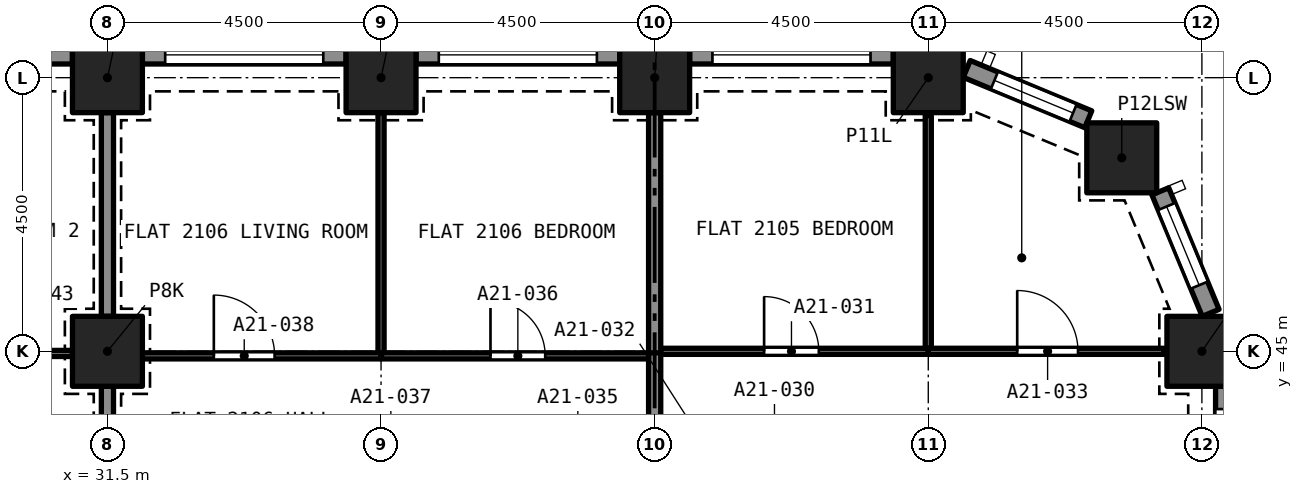
"""IFC4 building model, lengths in metres.
Left out: names, types, materials, properties, quantities, classifications, styles, units other than length and angle.
Written with IfcOpenShell. Run it as: python <this file> out.ifc"""

import sys

from ifc_helpers import new_model, si_unit, direction, frame, frame_2d, origin, origin_2d, place, context, subcontext, project, spatial, rectangle, extrude, element, fill, save


model = new_model("IFC4")
c1 = context("Model", 3, precision=1e-05, world=origin(), true_north=direction((0.0, 1.0)))
c2 = subcontext(c1, "Body", "Model", "MODEL_VIEW")
j1 = project(units=[si_unit("LENGTHUNIT", "METRE"), si_unit("PLANEANGLEUNIT", "RADIAN")], contexts=[c1])
p1 = place(None, origin())
s1 = spatial("IfcSite", under=j1, at=p1, CompositionType="ELEMENT")
p2 = place(p1, origin())
s2 = spatial("IfcBuilding", under=s1, at=p2, CompositionType="ELEMENT")
p3 = place(p2, frame((0.0, 0.0, 80.0)))
s3 = spatial("IfcBuildingStorey", under=s2, at=p3, CompositionType="ELEMENT", Elevation=80.0)
for number, where, z_axis, x_axis in (
    (1, (31.5, 45.0, 0.0), (0.0, 0.0, 1.0), (1.0, 0.0, 0.0)),
    (2, (49.5, 45.0, 0.0), (0.0, 0.0, 1.0), (1.0, 0.0, 0.0)),
    (3, (48.182, 48.182, 0.0), (0.0, 0.0, 1.0), (1.0, 0.0, 0.0)),
    (4, (31.5, 49.5, 0.0), (0.0, 0.0, 1.0), (1.0, 0.0, 0.0)),
    (5, (36.0, 49.5, 0.0), (0.0, 0.0, 1.0), (1.0, 0.0, 0.0)),
    (6, (40.5, 49.5, 0.0), (0.0, 0.0, 1.0), (1.0, 0.0, 0.0)),
    (7, (45.0, 49.5, 0.0), (0.0, 0.0, 1.0), (1.0, 0.0, 0.0)),
):
    element("IfcColumn", number, at=place(p3, frame(where, z_axis=z_axis, x_axis=x_axis)), inside=s3, PredefinedType="COLUMN", context=c2, shape_type="SweptSolid", body=[
        extrude(rectangle(XDim=1.15, YDim=1.15, at=origin_2d()), origin(), (0.0, 0.0, 1.0), 3.2),
    ])
p4 = place(p3, frame((49.875, 44.425, 0.0), z_axis=(0.0, 0.0, 1.0), x_axis=(0.0, -1.0, 0.0)))
e8 = element("IfcWall", 8, at=p4, inside=s3, PredefinedType="SOLIDWALL", context=c2, shape_type="SweptSolid", body=[
    extrude(rectangle(XDim=3.35, YDim=0.3, at=frame_2d((1.675, 0.0))), origin(), (0.0, 0.0, 1.0), 3.2),
])
p5 = place(p4, frame((0.375, 0.0, 0.45)))
e9 = element("IfcOpeningElement", 9, at=p5, cuts=e8, PredefinedType="OPENING", context=c2, shape_type="SweptSolid", body=[
    extrude(rectangle(XDim=2.6, YDim=1.95, at=frame_2d((1.3, 0.975))), frame((0.0, 0.16, 0.0), z_axis=(0.0, -1.0, 0.0), x_axis=(1.0, 0.0, 0.0)), (0.0, 0.0, 1.0), 0.32),
])
p6 = place(p3, frame((48.816, 47.631, 0.0), z_axis=(0.0, 0.0, 1.0), x_axis=(0.382723818695, -0.923862802911, 0.0)))
e10 = element("IfcWall", 10, at=p6, inside=s3, PredefinedType="SOLIDWALL", context=c2, shape_type="SweptSolid", body=[
    extrude(rectangle(XDim=2.164, YDim=0.3, at=frame_2d((1.082, 0.0))), origin(), (0.0, 0.0, 1.0), 3.2),
])
p7 = place(p6, frame((0.271, 0.0, 0.45)))
e11 = element("IfcOpeningElement", 11, at=p7, cuts=e10, PredefinedType="OPENING", context=c2, shape_type="SweptSolid", body=[
    extrude(rectangle(XDim=1.4, YDim=1.95, at=frame_2d((0.7, 0.975))), frame((0.0, 0.16, 0.0), z_axis=(0.0, -1.0, 0.0), x_axis=(1.0, 0.0, 0.0)), (0.0, 0.0, 1.0), 0.32),
])
p8 = place(p3, frame((45.632, 49.644, 0.0), z_axis=(0.0, 0.0, 1.0), x_axis=(0.923862802911, -0.382723818695, 0.0)))
e12 = element("IfcWall", 12, at=p8, inside=s3, PredefinedType="SOLIDWALL", context=c2, shape_type="SweptSolid", body=[
    extrude(rectangle(XDim=2.164, YDim=0.3, at=frame_2d((1.082, 0.0))), origin(), (0.0, 0.0, 1.0), 3.2),
])
p9 = place(p8, frame((0.493, 0.0, 0.45)))
e13 = element("IfcOpeningElement", 13, at=p9, cuts=e12, PredefinedType="OPENING", context=c2, shape_type="SweptSolid", body=[
    extrude(rectangle(XDim=1.4, YDim=1.95, at=frame_2d((0.7, 0.975))), frame((0.0, 0.16, 0.0), z_axis=(0.0, -1.0, 0.0), x_axis=(1.0, 0.0, 0.0)), (0.0, 0.0, 1.0), 0.32),
])
p10 = place(p3, frame((41.075, 49.875, 0.0), z_axis=(0.0, 0.0, 1.0), x_axis=(1.0, 0.0, 0.0)))
e14 = element("IfcWall", 14, at=p10, inside=s3, PredefinedType="SOLIDWALL", context=c2, shape_type="SweptSolid", body=[
    extrude(rectangle(XDim=3.35, YDim=0.3, at=frame_2d((1.675, 0.0))), origin(), (0.0, 0.0, 1.0), 3.2),
])
p11 = place(p10, frame((0.375, 0.0, 0.45)))
e15 = element("IfcOpeningElement", 15, at=p11, cuts=e14, PredefinedType="OPENING", context=c2, shape_type="SweptSolid", body=[
    extrude(rectangle(XDim=2.6, YDim=1.95, at=frame_2d((1.3, 0.975))), frame((0.0, 0.16, 0.0), z_axis=(0.0, -1.0, 0.0), x_axis=(1.0, 0.0, 0.0)), (0.0, 0.0, 1.0), 0.32),
])
p12 = place(p3, frame((36.575, 49.875, 0.0), z_axis=(0.0, 0.0, 1.0), x_axis=(1.0, 0.0, 0.0)))
e16 = element("IfcWall", 16, at=p12, inside=s3, PredefinedType="SOLIDWALL", context=c2, shape_type="SweptSolid", body=[
    extrude(rectangle(XDim=3.35, YDim=0.3, at=frame_2d((1.675, 0.0))), origin(), (0.0, 0.0, 1.0), 3.2),
])
p13 = place(p12, frame((0.375, 0.0, 0.45)))
e17 = element("IfcOpeningElement", 17, at=p13, cuts=e16, PredefinedType="OPENING", context=c2, shape_type="SweptSolid", body=[
    extrude(rectangle(XDim=2.6, YDim=1.95, at=frame_2d((1.3, 0.975))), frame((0.0, 0.16, 0.0), z_axis=(0.0, -1.0, 0.0), x_axis=(1.0, 0.0, 0.0)), (0.0, 0.0, 1.0), 0.32),
])
p14 = place(p3, frame((32.075, 49.875, 0.0), z_axis=(0.0, 0.0, 1.0), x_axis=(1.0, 0.0, 0.0)))
e18 = element("IfcWall", 18, at=p14, inside=s3, PredefinedType="SOLIDWALL", context=c2, shape_type="SweptSolid", body=[
    extrude(rectangle(XDim=3.35, YDim=0.3, at=frame_2d((1.675, 0.0))), origin(), (0.0, 0.0, 1.0), 3.2),
])
p15 = place(p14, frame((0.375, 0.0, 0.45)))
e19 = element("IfcOpeningElement", 19, at=p15, cuts=e18, PredefinedType="OPENING", context=c2, shape_type="SweptSolid", body=[
    extrude(rectangle(XDim=2.6, YDim=1.95, at=frame_2d((1.3, 0.975))), frame((0.0, 0.16, 0.0), z_axis=(0.0, -1.0, 0.0), x_axis=(1.0, 0.0, 0.0)), (0.0, 0.0, 1.0), 0.32),
])
p16 = place(p3, frame((27.575, 49.875, 0.0), z_axis=(0.0, 0.0, 1.0), x_axis=(1.0, 0.0, 0.0)))
e20 = element("IfcWall", 20, at=p16, inside=s3, PredefinedType="SOLIDWALL", context=c2, shape_type="SweptSolid", body=[
    extrude(rectangle(XDim=3.35, YDim=0.3, at=frame_2d((1.675, 0.0))), origin(), (0.0, 0.0, 1.0), 3.2),
])
p17 = place(p16, frame((0.375, 0.0, 0.45)))
e21 = element("IfcOpeningElement", 21, at=p17, cuts=e20, PredefinedType="OPENING", context=c2, shape_type="SweptSolid", body=[
    extrude(rectangle(XDim=2.6, YDim=1.95, at=frame_2d((1.3, 0.975))), frame((0.0, 0.16, 0.0), z_axis=(0.0, -1.0, 0.0), x_axis=(1.0, 0.0, 0.0)), (0.0, 0.0, 1.0), 0.32),
])
p18 = place(p3, frame((40.6, 45.0, 0.0), z_axis=(0.0, 0.0, 1.0), x_axis=(1.0, 0.0, 0.0)))
e22 = element("IfcWall", 22, at=p18, inside=s3, PredefinedType="PARTITIONING", context=c2, shape_type="SweptSolid", body=[
    extrude(rectangle(XDim=4.4, YDim=0.1, at=frame_2d((2.2, 0.0))), origin(), (0.0, 0.0, 1.0), 2.9),
])
p19 = place(p18, frame((1.7, 0.0, 0.0)))
e23 = element("IfcOpeningElement", 23, at=p19, cuts=e22, PredefinedType="OPENING", context=c2, shape_type="SweptSolid", body=[
    extrude(rectangle(XDim=0.9, YDim=2.1, at=frame_2d((0.45, 1.05))), frame((0.0, 0.06, 0.0), z_axis=(0.0, -1.0, 0.0), x_axis=(1.0, 0.0, 0.0)), (0.0, 0.0, 1.0), 0.12),
])
p20 = place(p3, frame((45.0, 45.05, 0.0), z_axis=(0.0, 0.0, 1.0), x_axis=(0.0, 1.0, 0.0)))
e24 = element("IfcWall", 24, at=p20, inside=s3, PredefinedType="PARTITIONING", context=c2, shape_type="SweptSolid", body=[
    extrude(rectangle(XDim=3.828, YDim=0.1, at=frame_2d((1.914, 0.0))), origin(), (0.0, 0.0, 1.0), 2.9),
])
p21 = place(p3, frame((40.5, 44.95, 0.0), z_axis=(0.0, 0.0, 1.0), x_axis=(0.0, 1.0, 0.0)))
e25 = element("IfcWall", 25, at=p21, inside=s3, PredefinedType="PARTITIONING", context=c2, shape_type="SweptSolid", body=[
    extrude(rectangle(XDim=3.975, YDim=0.2, at=frame_2d((1.988, 0.0))), origin(), (0.0, 0.0, 1.0), 2.9),
])
p22 = place(p3, frame((45.0, 45.0, 0.0), z_axis=(0.0, 0.0, 1.0), x_axis=(1.0, 0.0, 0.0)))
e26 = element("IfcWall", 26, at=p22, inside=s3, PredefinedType="PARTITIONING", context=c2, shape_type="SweptSolid", body=[
    extrude(rectangle(XDim=3.878, YDim=0.1, at=frame_2d((1.939, 0.0))), origin(), (0.0, 0.0, 1.0), 2.9),
])
p23 = place(p22, frame((1.462, 0.0, 0.0)))
e27 = element("IfcOpeningElement", 27, at=p23, cuts=e26, PredefinedType="OPENING", context=c2, shape_type="SweptSolid", body=[
    extrude(rectangle(XDim=1.0, YDim=2.1, at=frame_2d((0.5, 1.05))), frame((0.0, 0.06, 0.0), z_axis=(0.0, -1.0, 0.0), x_axis=(1.0, 0.0, 0.0)), (0.0, 0.0, 1.0), 0.12),
])
p24 = place(p3, frame((40.5, 43.61, 0.0), z_axis=(0.0, 0.0, 1.0), x_axis=(0.0, 1.0, 0.0)))
e28 = element("IfcWall", 28, at=p24, inside=s3, PredefinedType="PARTITIONING", context=c2, shape_type="SweptSolid", body=[
    extrude(rectangle(XDim=1.365, YDim=0.2, at=frame_2d((0.683, 0.0))), origin(), (0.0, 0.0, 1.0), 2.9),
])
p25 = place(p3, frame((36.0, 44.925, 0.0), z_axis=(0.0, 0.0, 1.0), x_axis=(1.0, 0.0, 0.0)))
e29 = element("IfcWall", 29, at=p25, inside=s3, PredefinedType="PARTITIONING", context=c2, shape_type="SweptSolid", body=[
    extrude(rectangle(XDim=4.4, YDim=0.1, at=frame_2d((2.2, 0.0))), origin(), (0.0, 0.0, 1.0), 2.9),
])
p26 = place(p25, frame((1.8, 0.0, 0.0)))
e30 = element("IfcOpeningElement", 30, at=p26, cuts=e29, PredefinedType="OPENING", context=c2, shape_type="SweptSolid", body=[
    extrude(rectangle(XDim=0.9, YDim=2.1, at=frame_2d((0.45, 1.05))), frame((0.0, 0.06, 0.0), z_axis=(0.0, -1.0, 0.0), x_axis=(1.0, 0.0, 0.0)), (0.0, 0.0, 1.0), 0.12),
])
p27 = place(p3, frame((36.0, 44.975, 0.0), z_axis=(0.0, 0.0, 1.0), x_axis=(0.0, 1.0, 0.0)))
e31 = element("IfcWall", 31, at=p27, inside=s3, PredefinedType="PARTITIONING", context=c2, shape_type="SweptSolid", body=[
    extrude(rectangle(XDim=3.95, YDim=0.1, at=frame_2d((1.975, 0.0))), origin(), (0.0, 0.0, 1.0), 2.9),
])
p28 = place(p3, frame((32.075, 44.925, 0.0), z_axis=(0.0, 0.0, 1.0), x_axis=(1.0, 0.0, 0.0)))
e32 = element("IfcWall", 32, at=p28, inside=s3, PredefinedType="PARTITIONING", context=c2, shape_type="SweptSolid", body=[
    extrude(rectangle(XDim=3.925, YDim=0.1, at=frame_2d((1.962, 0.0))), origin(), (0.0, 0.0, 1.0), 2.9),
])
p29 = place(p28, frame((1.175, 0.0, 0.0)))
e33 = element("IfcOpeningElement", 33, at=p29, cuts=e32, PredefinedType="OPENING", context=c2, shape_type="SweptSolid", body=[
    extrude(rectangle(XDim=1.0, YDim=2.1, at=frame_2d((0.5, 1.05))), frame((0.0, 0.06, 0.0), z_axis=(0.0, -1.0, 0.0), x_axis=(1.0, 0.0, 0.0)), (0.0, 0.0, 1.0), 0.12),
])
for number, where, z_axis, x_axis in (
    (34, (31.5, 41.075, 0.0), (0.0, 0.0, 1.0), (0.0, 1.0, 0.0)),
    (35, (31.5, 45.575, 0.0), (0.0, 0.0, 1.0), (0.0, 1.0, 0.0)),
):
    element("IfcWall", number, at=place(p3, frame(where, z_axis=z_axis, x_axis=x_axis)), inside=s3, PredefinedType="PARTITIONING", context=c2, shape_type="SweptSolid", body=[
        extrude(rectangle(XDim=3.35, YDim=0.2, at=frame_2d((1.675, 0.0))), origin(), (0.0, 0.0, 1.0), 2.38),
    ])
p30 = place(p3, frame((27.0, 44.965, 0.0), z_axis=(0.0, 0.0, 1.0), x_axis=(1.0, 0.0, 0.0)))
e36 = element("IfcWall", 36, at=p30, inside=s3, PredefinedType="PARTITIONING", context=c2, shape_type="SweptSolid", body=[
    extrude(rectangle(XDim=3.925, YDim=0.1, at=frame_2d((1.962, 0.0))), origin(), (0.0, 0.0, 1.0), 2.75),
])
p31 = place(p30, frame((1.8, 0.0, 0.0)))
e37 = element("IfcOpeningElement", 37, at=p31, cuts=e36, PredefinedType="OPENING", context=c2, shape_type="SweptSolid", body=[
    extrude(rectangle(XDim=0.9, YDim=2.1, at=frame_2d((0.45, 1.05))), frame((0.0, 0.06, 0.0), z_axis=(0.0, -1.0, 0.0), x_axis=(1.0, 0.0, 0.0)), (0.0, 0.0, 1.0), 0.12),
])
p32 = place(p5, origin())
e38 = element("IfcWindow", 38, at=p32, inside=s3, PartitioningType="SINGLE_PANEL", PredefinedType="WINDOW", context=c2, shape_type="SweptSolid", body=[
    extrude(rectangle(XDim=2.6, YDim=1.95, at=frame_2d((1.3, 0.975))), frame((0.0, 0.03, 0.0), z_axis=(0.0, -1.0, 0.0), x_axis=(1.0, 0.0, 0.0)), (0.0, 0.0, 1.0), 0.06),
])
fill(e9, e38)
p33 = place(p7, origin())
e39 = element("IfcWindow", 39, at=p33, inside=s3, PartitioningType="SINGLE_PANEL", PredefinedType="WINDOW", context=c2, shape_type="SweptSolid", body=[
    extrude(rectangle(XDim=1.4, YDim=1.95, at=frame_2d((0.7, 0.975))), frame((0.0, 0.03, 0.0), z_axis=(0.0, -1.0, 0.0), x_axis=(1.0, 0.0, 0.0)), (0.0, 0.0, 1.0), 0.06),
])
fill(e11, e39)
p34 = place(p9, origin())
e40 = element("IfcWindow", 40, at=p34, inside=s3, PartitioningType="SINGLE_PANEL", PredefinedType="WINDOW", context=c2, shape_type="SweptSolid", body=[
    extrude(rectangle(XDim=1.4, YDim=1.95, at=frame_2d((0.7, 0.975))), frame((0.0, 0.03, 0.0), z_axis=(0.0, -1.0, 0.0), x_axis=(1.0, 0.0, 0.0)), (0.0, 0.0, 1.0), 0.06),
])
fill(e13, e40)
p35 = place(p11, origin())
e41 = element("IfcWindow", 41, at=p35, inside=s3, PartitioningType="SINGLE_PANEL", PredefinedType="WINDOW", context=c2, shape_type="SweptSolid", body=[
    extrude(rectangle(XDim=2.6, YDim=1.95, at=frame_2d((1.3, 0.975))), frame((0.0, 0.03, 0.0), z_axis=(0.0, -1.0, 0.0), x_axis=(1.0, 0.0, 0.0)), (0.0, 0.0, 1.0), 0.06),
])
fill(e15, e41)
p36 = place(p13, origin())
e42 = element("IfcWindow", 42, at=p36, inside=s3, PartitioningType="SINGLE_PANEL", PredefinedType="WINDOW", context=c2, shape_type="SweptSolid", body=[
    extrude(rectangle(XDim=2.6, YDim=1.95, at=frame_2d((1.3, 0.975))), frame((0.0, 0.03, 0.0), z_axis=(0.0, -1.0, 0.0), x_axis=(1.0, 0.0, 0.0)), (0.0, 0.0, 1.0), 0.06),
])
fill(e17, e42)
p37 = place(p15, origin())
e43 = element("IfcWindow", 43, at=p37, inside=s3, PartitioningType="SINGLE_PANEL", PredefinedType="WINDOW", context=c2, shape_type="SweptSolid", body=[
    extrude(rectangle(XDim=2.6, YDim=1.95, at=frame_2d((1.3, 0.975))), frame((0.0, 0.03, 0.0), z_axis=(0.0, -1.0, 0.0), x_axis=(1.0, 0.0, 0.0)), (0.0, 0.0, 1.0), 0.06),
])
fill(e19, e43)
p38 = place(p19, origin())
e44 = element("IfcDoor", 44, at=p38, inside=s3, OperationType="SINGLE_SWING_LEFT", PredefinedType="DOOR", context=c2, shape_type="SweptSolid", body=[
    extrude(rectangle(XDim=0.9, YDim=2.1, at=frame_2d((0.45, 1.05))), frame((0.0, 0.025, 0.0), z_axis=(0.0, -1.0, 0.0), x_axis=(1.0, 0.0, 0.0)), (0.0, 0.0, 1.0), 0.05),
])
fill(e23, e44)
p39 = place(p23, origin())
e45 = element("IfcDoor", 45, at=p39, inside=s3, OperationType="SINGLE_SWING_RIGHT", PredefinedType="DOOR", context=c2, shape_type="SweptSolid", body=[
    extrude(rectangle(XDim=1.0, YDim=2.1, at=frame_2d((0.5, 1.05))), frame((0.0, 0.025, 0.0), z_axis=(0.0, -1.0, 0.0), x_axis=(1.0, 0.0, 0.0)), (0.0, 0.0, 1.0), 0.05),
])
fill(e27, e45)
p40 = place(p26, origin())
e46 = element("IfcDoor", 46, at=p40, inside=s3, OperationType="SINGLE_SWING_RIGHT", PredefinedType="DOOR", context=c2, shape_type="SweptSolid", body=[
    extrude(rectangle(XDim=0.9, YDim=2.1, at=frame_2d((0.45, 1.05))), frame((0.0, 0.025, 0.0), z_axis=(0.0, -1.0, 0.0), x_axis=(1.0, 0.0, 0.0)), (0.0, 0.0, 1.0), 0.05),
])
fill(e30, e46)
p41 = place(p29, origin())
e47 = element("IfcDoor", 47, at=p41, inside=s3, OperationType="SINGLE_SWING_LEFT", PredefinedType="DOOR", context=c2, shape_type="SweptSolid", body=[
    extrude(rectangle(XDim=1.0, YDim=2.1, at=frame_2d((0.5, 1.05))), frame((0.0, 0.025, 0.0), z_axis=(0.0, -1.0, 0.0), x_axis=(1.0, 0.0, 0.0)), (0.0, 0.0, 1.0), 0.05),
])
fill(e33, e47)
save(model, sys.argv[1])
